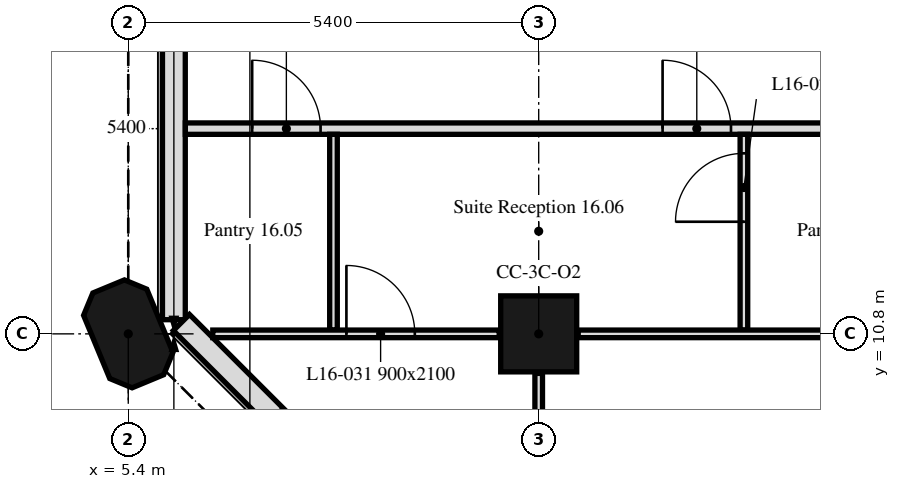
"""IFC4 building model, lengths in metres.
Left out: names, types, materials, properties, quantities, classifications, styles, units other than length and angle.
Written with IfcOpenShell. Run it as: python <this file> out.ifc"""

import sys

from ifc_helpers import new_model, si_unit, direction, frame, frame_2d, origin, origin_2d, place, context, subcontext, project, spatial, polyline, rectangle, outline, extrude, element, fill, save


model = new_model("IFC4")
c1 = context("Model", 3, precision=1e-05, world=origin(), true_north=direction((0.0, 1.0)))
c2 = subcontext(c1, "Body", "Model", "MODEL_VIEW")
j1 = project(units=[si_unit("LENGTHUNIT", "METRE"), si_unit("PLANEANGLEUNIT", "RADIAN")], contexts=[c1])
p1 = place(None, origin())
s1 = spatial("IfcSite", under=j1, at=p1, CompositionType="ELEMENT")
p2 = place(p1, origin())
s2 = spatial("IfcBuilding", under=s1, at=p2, CompositionType="ELEMENT")
p3 = place(p2, frame((0.0, 0.0, 72.6)))
s3 = spatial("IfcBuildingStorey", under=s2, at=p3, CompositionType="ELEMENT", Elevation=72.6)
p4 = place(p3, frame((5.4, 10.8, 0.0), z_axis=(0.0, 0.0, 1.0), x_axis=(-0.382683432365, 0.923879532511, 0.0)))
e1 = element("IfcColumn", 1, at=p4, inside=s3, PredefinedType="COLUMN", context=c2, shape_type="SweptSolid", body=[
    extrude(outline(polyline([(-0.45, -0.45), (0.45, -0.45), (0.675, -0.225), (0.675, 0.225), (0.45, 0.45), (-0.45, 0.45), (-0.675, 0.225), (-0.675, -0.225), (-0.45, -0.45)])), origin(), (0.0, 0.0, 1.0), 3.5),
])
p5 = place(p3, frame((10.8, 10.8, 0.0), z_axis=(0.0, 0.0, 1.0), x_axis=(1.0, 0.0, 0.0)))
e2 = element("IfcColumn", 2, at=p5, inside=s3, PredefinedType="COLUMN", context=c2, shape_type="SweptSolid", body=[
    extrude(rectangle(XDim=1.0, YDim=1.0, at=origin_2d()), origin(), (0.0, 0.0, 1.0), 3.5),
])
p6 = place(p3, frame((6.0, 16.2, 0.0), z_axis=(0.0, 0.0, 1.0), x_axis=(0.0, -1.0, 0.0)))
e3 = element("IfcWall", 3, at=p6, inside=s3, PredefinedType="SOLIDWALL", context=c2, shape_type="SweptSolid", body=[
    extrude(rectangle(XDim=5.214, YDim=0.3, at=frame_2d((2.607, 0.0))), origin(), (0.0, 0.0, 1.0), 3.5),
])
p7 = place(p3, frame((6.099, 10.949, 0.0), z_axis=(0.0, 0.0, 1.0), x_axis=(0.707106781187, -0.707106781187, 0.0)))
e4 = element("IfcWall", 4, at=p7, inside=s3, PredefinedType="SOLIDWALL", context=c2, shape_type="SweptSolid", body=[
    extrude(rectangle(XDim=6.86, YDim=0.3, at=frame_2d((3.43, 0.0))), origin(), (0.0, 0.0, 1.0), 3.5),
])
p8 = place(p7, frame((1.73, 0.0, 0.9)))
e5 = element("IfcOpeningElement", 5, at=p8, cuts=e4, PredefinedType="OPENING", context=c2, shape_type="SweptSolid", body=[
    extrude(rectangle(XDim=3.4, YDim=1.7, at=frame_2d((1.7, 0.85))), frame((0.0, 0.16, 0.0), z_axis=(0.0, -1.0, 0.0), x_axis=(1.0, 0.0, 0.0)), (0.0, 0.0, 1.0), 0.32),
])
p9 = place(p3, frame((6.151, 13.5, 0.0), z_axis=(0.0, 0.0, 1.0), x_axis=(1.0, 0.0, 0.0)))
e6 = element("IfcWall", 6, at=p9, inside=s3, PredefinedType="PARTITIONING", context=c2, shape_type="SweptSolid", body=[
    extrude(rectangle(XDim=15.349, YDim=0.15, at=frame_2d((7.675, 0.0))), origin(), (0.0, 0.0, 1.0), 3.5),
])
p10 = place(p9, frame((0.879, 0.0, 0.0)))
e7 = element("IfcOpeningElement", 7, at=p10, cuts=e6, PredefinedType="OPENING", context=c2, shape_type="SweptSolid", body=[
    extrude(rectangle(XDim=0.9, YDim=2.1, at=frame_2d((0.45, 1.05))), frame((0.0, 0.075, 0.0), z_axis=(0.0, -1.0, 0.0), x_axis=(1.0, 0.0, 0.0)), (0.0, 0.0, 1.0), 0.15),
])
p11 = place(p9, frame((11.679, 0.0, 0.0)))
e8 = element("IfcOpeningElement", 8, at=p11, cuts=e6, PredefinedType="OPENING", context=c2, shape_type="SweptSolid", body=[
    extrude(rectangle(XDim=0.9, YDim=2.1, at=frame_2d((0.45, 1.05))), frame((0.0, 0.075, 0.0), z_axis=(0.0, -1.0, 0.0), x_axis=(1.0, 0.0, 0.0)), (0.0, 0.0, 1.0), 0.15),
])
p12 = place(p9, frame((12.919, 0.0, 0.0)))
e9 = element("IfcOpeningElement", 9, at=p12, cuts=e6, PredefinedType="OPENING", context=c2, shape_type="SweptSolid", body=[
    extrude(rectangle(XDim=0.9, YDim=2.1, at=frame_2d((0.45, 1.05))), frame((0.0, 0.075, 0.0), z_axis=(0.0, -1.0, 0.0), x_axis=(1.0, 0.0, 0.0)), (0.0, 0.0, 1.0), 0.15),
])
p13 = place(p9, frame((6.279, 0.0, 0.0)))
e10 = element("IfcOpeningElement", 10, at=p13, cuts=e6, PredefinedType="OPENING", context=c2, shape_type="SweptSolid", body=[
    extrude(rectangle(XDim=0.9, YDim=2.1, at=frame_2d((0.45, 1.05))), frame((0.0, 0.075, 0.0), z_axis=(0.0, -1.0, 0.0), x_axis=(1.0, 0.0, 0.0)), (0.0, 0.0, 1.0), 0.15),
])
p14 = place(p3, frame((8.1, 10.85, 0.0), z_axis=(0.0, 0.0, 1.0), x_axis=(0.0, 1.0, 0.0)))
e11 = element("IfcWall", 11, at=p14, inside=s3, PredefinedType="PARTITIONING", context=c2, shape_type="SweptSolid", body=[
    extrude(rectangle(XDim=2.575, YDim=0.1, at=frame_2d((1.288, 0.0))), origin(), (0.0, 0.0, 1.0), 3.5),
])
p15 = place(p3, frame((6.512, 10.8, 0.0), z_axis=(0.0, 0.0, 1.0), x_axis=(1.0, 0.0, 0.0)))
e12 = element("IfcWall", 12, at=p15, inside=s3, PredefinedType="PARTITIONING", context=c2, shape_type="SweptSolid", body=[
    extrude(rectangle(XDim=3.768, YDim=0.1, at=frame_2d((1.884, 0.0))), origin(), (0.0, 0.0, 1.0), 3.5),
])
p16 = place(p15, frame((1.758, 0.0, 0.0)))
e13 = element("IfcOpeningElement", 13, at=p16, cuts=e12, PredefinedType="OPENING", context=c2, shape_type="SweptSolid", body=[
    extrude(rectangle(XDim=0.9, YDim=2.1, at=frame_2d((0.45, 1.05))), frame((0.0, 0.05, 0.0), z_axis=(0.0, -1.0, 0.0), x_axis=(1.0, 0.0, 0.0)), (0.0, 0.0, 1.0), 0.1),
])
p17 = place(p3, frame((13.5, 10.85, 0.0), z_axis=(0.0, 0.0, 1.0), x_axis=(0.0, 1.0, 0.0)))
e14 = element("IfcWall", 14, at=p17, inside=s3, PredefinedType="PARTITIONING", context=c2, shape_type="SweptSolid", body=[
    extrude(rectangle(XDim=2.575, YDim=0.1, at=frame_2d((1.288, 0.0))), origin(), (0.0, 0.0, 1.0), 3.5),
])
p18 = place(p17, frame((1.425, 0.0, 0.0)))
e15 = element("IfcOpeningElement", 15, at=p18, cuts=e14, PredefinedType="OPENING", context=c2, shape_type="SweptSolid", body=[
    extrude(rectangle(XDim=0.9, YDim=2.1, at=frame_2d((0.45, 1.05))), frame((0.0, 0.05, 0.0), z_axis=(0.0, -1.0, 0.0), x_axis=(1.0, 0.0, 0.0)), (0.0, 0.0, 1.0), 0.1),
])
p19 = place(p3, frame((11.32, 10.8, 0.0), z_axis=(0.0, 0.0, 1.0), x_axis=(1.0, 0.0, 0.0)))
e16 = element("IfcWall", 16, at=p19, inside=s3, PredefinedType="PARTITIONING", context=c2, shape_type="SweptSolid", body=[
    extrude(rectangle(XDim=4.36, YDim=0.1, at=frame_2d((2.18, 0.0))), origin(), (0.0, 0.0, 1.0), 3.5),
])
p20 = place(p3, frame((10.8, 6.512, 0.0), z_axis=(0.0, 0.0, 1.0), x_axis=(0.0, 1.0, 0.0)))
e17 = element("IfcWall", 17, at=p20, inside=s3, PredefinedType="PARTITIONING", context=c2, shape_type="SweptSolid", body=[
    extrude(rectangle(XDim=3.768, YDim=0.1, at=frame_2d((1.884, 0.0))), origin(), (0.0, 0.0, 1.0), 3.5),
])
p21 = place(p20, frame((1.813, 0.0, 0.0)))
e18 = element("IfcOpeningElement", 18, at=p21, cuts=e17, PredefinedType="OPENING", context=c2, shape_type="SweptSolid", body=[
    extrude(rectangle(XDim=0.9, YDim=2.1, at=frame_2d((0.45, 1.05))), frame((0.0, 0.05, 0.0), z_axis=(0.0, -1.0, 0.0), x_axis=(1.0, 0.0, 0.0)), (0.0, 0.0, 1.0), 0.1),
])
p22 = place(p10, origin())
e19 = element("IfcDoor", 19, at=p22, inside=s3, OperationType="SINGLE_SWING_LEFT", PredefinedType="DOOR", context=c2, shape_type="SweptSolid", body=[
    extrude(rectangle(XDim=0.9, YDim=2.1, at=frame_2d((0.45, 1.05))), frame((0.0, 0.025, 0.0), z_axis=(0.0, -1.0, 0.0), x_axis=(1.0, 0.0, 0.0)), (0.0, 0.0, 1.0), 0.05),
])
fill(e7, e19)
p23 = place(p18, origin())
e20 = element("IfcDoor", 20, at=p23, inside=s3, OperationType="SINGLE_SWING_LEFT", PredefinedType="DOOR", context=c2, shape_type="SweptSolid", body=[
    extrude(rectangle(XDim=0.9, YDim=2.1, at=frame_2d((0.45, 1.05))), frame((0.0, 0.025, 0.0), z_axis=(0.0, -1.0, 0.0), x_axis=(1.0, 0.0, 0.0)), (0.0, 0.0, 1.0), 0.05),
])
fill(e15, e20)
p24 = place(p16, origin())
e21 = element("IfcDoor", 21, at=p24, inside=s3, OperationType="SINGLE_SWING_RIGHT", PredefinedType="DOOR", context=c2, shape_type="SweptSolid", body=[
    extrude(rectangle(XDim=0.9, YDim=2.1, at=frame_2d((0.45, 1.05))), frame((0.0, 0.025, 0.0), z_axis=(0.0, -1.0, 0.0), x_axis=(1.0, 0.0, 0.0)), (0.0, 0.0, 1.0), 0.05),
])
fill(e13, e21)
p25 = place(p13, origin())
e22 = element("IfcDoor", 22, at=p25, inside=s3, OperationType="SINGLE_SWING_LEFT", PredefinedType="DOOR", context=c2, shape_type="SweptSolid", body=[
    extrude(rectangle(XDim=0.9, YDim=2.1, at=frame_2d((0.45, 1.05))), frame((0.0, 0.025, 0.0), z_axis=(0.0, -1.0, 0.0), x_axis=(1.0, 0.0, 0.0)), (0.0, 0.0, 1.0), 0.05),
])
fill(e10, e22)
save(model, sys.argv[1])
